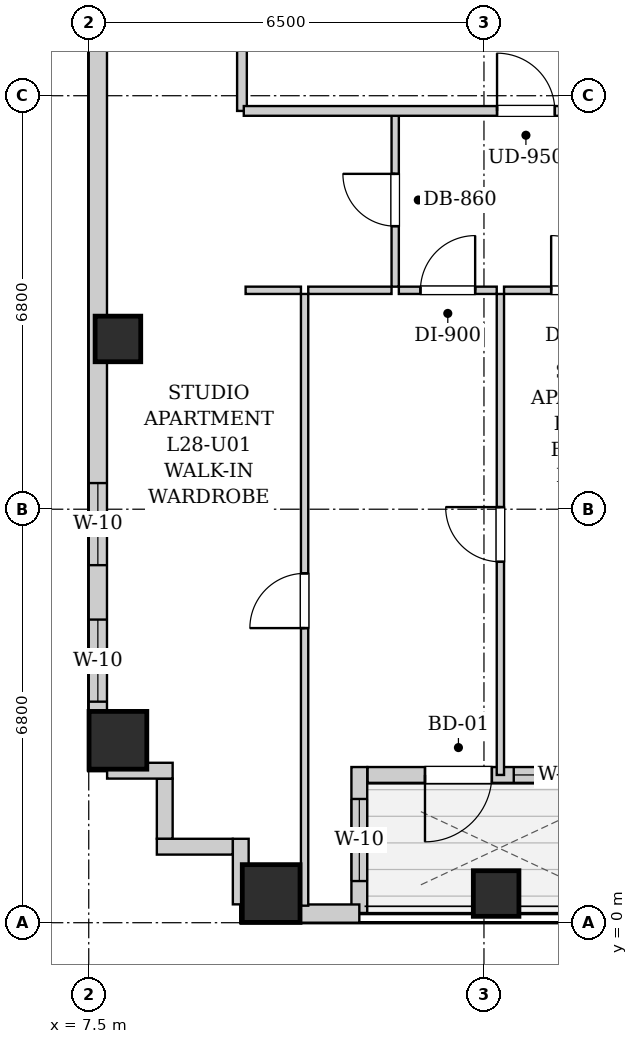
"""IFC4 building model, lengths in metres.
Left out: names, types, materials, properties, quantities, classifications, styles, units other than length and angle.
Written with IfcOpenShell. Run it as: python <this file> out.ifc"""

import sys

from ifc_helpers import new_model, si_unit, direction, frame, frame_2d, origin, origin_2d, place, context, subcontext, project, spatial, rectangle, extrude, element, fill, save


model = new_model("IFC4")
c1 = context("Model", 3, precision=1e-05, world=origin(), true_north=direction((0.0, 1.0)))
c2 = subcontext(c1, "Body", "Model", "MODEL_VIEW")
j1 = project(units=[si_unit("LENGTHUNIT", "METRE"), si_unit("PLANEANGLEUNIT", "RADIAN")], contexts=[c1])
p1 = place(None, origin())
s1 = spatial("IfcSite", under=j1, at=p1, CompositionType="ELEMENT")
p2 = place(p1, origin())
s2 = spatial("IfcBuilding", under=s1, at=p2, CompositionType="ELEMENT")
p3 = place(p2, frame((0.0, 0.0, 100.7)))
s3 = spatial("IfcBuildingStorey", under=s2, at=p3, CompositionType="ELEMENT", Elevation=100.7)
p4 = place(p3, frame((10.5, 0.48, 0.0), z_axis=(0.0, 0.0, 1.0), x_axis=(1.0, 0.0, 0.0)))
e1 = element("IfcColumn", 1, at=p4, inside=s3, PredefinedType="COLUMN", context=c2, shape_type="SweptSolid", body=[
    extrude(rectangle(XDim=0.95, YDim=0.95, at=origin_2d()), origin(), (0.0, 0.0, 1.0), 3.2),
])
p5 = place(p3, frame((14.2, 0.48, 0.0), z_axis=(0.0, 0.0, 1.0), x_axis=(1.0, 0.0, 0.0)))
e2 = element("IfcColumn", 2, at=p5, inside=s3, PredefinedType="COLUMN", context=c2, shape_type="SweptSolid", body=[
    extrude(rectangle(XDim=0.75, YDim=0.75, at=origin_2d()), origin(), (0.0, 0.0, 1.0), 3.2),
])
p6 = place(p3, frame((7.98, 3.0, 0.0), z_axis=(0.0, 0.0, 1.0), x_axis=(1.0, 0.0, 0.0)))
e3 = element("IfcColumn", 3, at=p6, inside=s3, PredefinedType="COLUMN", context=c2, shape_type="SweptSolid", body=[
    extrude(rectangle(XDim=0.95, YDim=0.95, at=origin_2d()), origin(), (0.0, 0.0, 1.0), 3.2),
])
p7 = place(p3, frame((7.98, 9.6, 0.0), z_axis=(0.0, 0.0, 1.0), x_axis=(1.0, 0.0, 0.0)))
e4 = element("IfcColumn", 4, at=p7, inside=s3, PredefinedType="COLUMN", context=c2, shape_type="SweptSolid", body=[
    extrude(rectangle(XDim=0.75, YDim=0.75, at=origin_2d()), origin(), (0.0, 0.0, 1.0), 3.2),
])
p8 = place(p3, frame((16.416, 2.43, 0.0), z_axis=(0.0, 0.0, 1.0), x_axis=(-1.0, 0.0, 0.0)))
e5 = element("IfcWall", 5, at=p8, inside=s3, PredefinedType="SOLIDWALL", context=c2, shape_type="SweptSolid", body=[
    extrude(rectangle(XDim=4.332, YDim=0.26, at=frame_2d((2.166, 0.0))), origin(), (0.0, 0.0, 1.0), 2.94),
])
p9 = place(p8, frame((2.286, 0.0, 0.0)))
e6 = element("IfcOpeningElement", 6, at=p9, cuts=e5, PredefinedType="OPENING", context=c2, shape_type="SweptSolid", body=[
    extrude(rectangle(XDim=1.1, YDim=2.0, at=frame_2d((0.55, 1.0))), frame((0.0, 0.14, 0.0), z_axis=(0.0, -1.0, 0.0), x_axis=(1.0, 0.0, 0.0)), (0.0, 0.0, 1.0), 0.28),
])
p10 = place(p8, frame((0.326, 0.0, 0.85)))
e7 = element("IfcOpeningElement", 7, at=p10, cuts=e5, PredefinedType="OPENING", context=c2, shape_type="SweptSolid", body=[
    extrude(rectangle(XDim=1.6, YDim=1.65, at=frame_2d((0.8, 0.825))), frame((0.0, 0.14, 0.0), z_axis=(0.0, -1.0, 0.0), x_axis=(1.0, 0.0, 0.0)), (0.0, 0.0, 1.0), 0.28),
])
p11 = place(p3, frame((11.95, 2.56, 0.0), z_axis=(0.0, 0.0, 1.0), x_axis=(0.0, -1.0, 0.0)))
e8 = element("IfcWall", 8, at=p11, inside=s3, PredefinedType="SOLIDWALL", context=c2, shape_type="SweptSolid", body=[
    extrude(rectangle(XDim=2.4, YDim=0.26, at=frame_2d((1.2, 0.0))), origin(), (0.0, 0.0, 1.0), 2.94),
])
p12 = place(p11, frame((0.525, 0.0, 0.55)))
e9 = element("IfcOpeningElement", 9, at=p12, cuts=e8, PredefinedType="OPENING", context=c2, shape_type="SweptSolid", body=[
    extrude(rectangle(XDim=1.35, YDim=1.2, at=frame_2d((0.675, 0.6))), frame((0.0, 0.14, 0.0), z_axis=(0.0, -1.0, 0.0), x_axis=(1.0, 0.0, 0.0)), (0.0, 0.0, 1.0), 0.28),
])
p13 = place(p3, frame((11.95, 0.15, 0.0), z_axis=(0.0, 0.0, 1.0), x_axis=(-1.0, 0.0, 0.0)))
e10 = element("IfcWall", 10, at=p13, inside=s3, PredefinedType="SOLIDWALL", context=c2, shape_type="SweptSolid", body=[
    extrude(rectangle(XDim=1.95, YDim=0.3, at=frame_2d((0.975, 0.0))), origin(), (0.0, 0.0, 1.0), 2.94),
])
p14 = place(p3, frame((7.65, 2.5, 0.0), z_axis=(0.0, 0.0, 1.0), x_axis=(0.0, 1.0, 0.0)))
e11 = element("IfcWall", 11, at=p14, inside=s3, PredefinedType="SOLIDWALL", context=c2, shape_type="SweptSolid", body=[
    extrude(rectangle(XDim=38.3, YDim=0.3, at=frame_2d((19.15, 0.0))), origin(), (0.0, 0.0, 1.0), 2.94),
])
p15 = place(p14, frame((3.38, 0.0, 0.55)))
e12 = element("IfcOpeningElement", 12, at=p15, cuts=e11, PredefinedType="OPENING", context=c2, shape_type="SweptSolid", body=[
    extrude(rectangle(XDim=1.35, YDim=1.2, at=frame_2d((0.675, 0.6))), frame((0.0, 0.16, 0.0), z_axis=(0.0, -1.0, 0.0), x_axis=(1.0, 0.0, 0.0)), (0.0, 0.0, 1.0), 0.32),
])
p16 = place(p14, frame((1.135, 0.0, 0.55)))
e13 = element("IfcOpeningElement", 13, at=p16, cuts=e11, PredefinedType="OPENING", context=c2, shape_type="SweptSolid", body=[
    extrude(rectangle(XDim=1.35, YDim=1.2, at=frame_2d((0.675, 0.6))), frame((0.0, 0.16, 0.0), z_axis=(0.0, -1.0, 0.0), x_axis=(1.0, 0.0, 0.0)), (0.0, 0.0, 1.0), 0.32),
])
p17 = place(p14, frame((33.946, 0.0, 0.55)))
e14 = element("IfcOpeningElement", 14, at=p17, cuts=e11, PredefinedType="OPENING", context=c2, shape_type="SweptSolid", body=[
    extrude(rectangle(XDim=1.35, YDim=1.2, at=frame_2d((0.675, 0.6))), frame((0.0, 0.16, 0.0), z_axis=(0.0, -1.0, 0.0), x_axis=(1.0, 0.0, 0.0)), (0.0, 0.0, 1.0), 0.32),
])
p18 = place(p14, frame((32.035, 0.0, 0.55)))
e15 = element("IfcOpeningElement", 15, at=p18, cuts=e11, PredefinedType="OPENING", context=c2, shape_type="SweptSolid", body=[
    extrude(rectangle(XDim=1.35, YDim=1.2, at=frame_2d((0.675, 0.6))), frame((0.0, 0.16, 0.0), z_axis=(0.0, -1.0, 0.0), x_axis=(1.0, 0.0, 0.0)), (0.0, 0.0, 1.0), 0.32),
])
p19 = place(p14, frame((15.65, 0.0, 0.55)))
e16 = element("IfcOpeningElement", 16, at=p19, cuts=e11, PredefinedType="OPENING", context=c2, shape_type="SweptSolid", body=[
    extrude(rectangle(XDim=1.35, YDim=1.2, at=frame_2d((0.675, 0.6))), frame((0.0, 0.16, 0.0), z_axis=(0.0, -1.0, 0.0), x_axis=(1.0, 0.0, 0.0)), (0.0, 0.0, 1.0), 0.32),
])
p20 = place(p14, frame((13.035, 0.0, 0.55)))
e17 = element("IfcOpeningElement", 17, at=p20, cuts=e11, PredefinedType="OPENING", context=c2, shape_type="SweptSolid", body=[
    extrude(rectangle(XDim=1.35, YDim=1.2, at=frame_2d((0.675, 0.6))), frame((0.0, 0.16, 0.0), z_axis=(0.0, -1.0, 0.0), x_axis=(1.0, 0.0, 0.0)), (0.0, 0.0, 1.0), 0.32),
])
p21 = place(p14, frame((22.831, 0.0, 0.55)))
e18 = element("IfcOpeningElement", 18, at=p21, cuts=e11, PredefinedType="OPENING", context=c2, shape_type="SweptSolid", body=[
    extrude(rectangle(XDim=1.35, YDim=1.2, at=frame_2d((0.675, 0.6))), frame((0.0, 0.16, 0.0), z_axis=(0.0, -1.0, 0.0), x_axis=(1.0, 0.0, 0.0)), (0.0, 0.0, 1.0), 0.32),
])
p22 = place(p14, frame((24.441, 0.0, 0.55)))
e19 = element("IfcOpeningElement", 19, at=p22, cuts=e11, PredefinedType="OPENING", context=c2, shape_type="SweptSolid", body=[
    extrude(rectangle(XDim=1.35, YDim=1.2, at=frame_2d((0.675, 0.6))), frame((0.0, 0.16, 0.0), z_axis=(0.0, -1.0, 0.0), x_axis=(1.0, 0.0, 0.0)), (0.0, 0.0, 1.0), 0.32),
])
p23 = place(p3, frame((10.0, 0.302, 0.0), z_axis=(0.0, 0.0, 1.0), x_axis=(0.0, 1.0, 0.0)))
e20 = element("IfcWall", 20, at=p23, inside=s3, PredefinedType="SOLIDWALL", context=c2, shape_type="SweptSolid", body=[
    extrude(rectangle(XDim=1.078, YDim=0.26, at=frame_2d((0.539, 0.0))), origin(), (0.0, 0.0, 1.0), 2.94),
])
p24 = place(p3, frame((9.868, 1.25, 0.0), z_axis=(0.0, 0.0, 1.0), x_axis=(-1.0, 0.0, 0.0)))
e21 = element("IfcWall", 21, at=p24, inside=s3, PredefinedType="SOLIDWALL", context=c2, shape_type="SweptSolid", body=[
    extrude(rectangle(XDim=1.248, YDim=0.26, at=frame_2d((0.624, 0.0))), origin(), (0.0, 0.0, 1.0), 2.94),
])
p25 = place(p3, frame((8.75, 1.382, 0.0), z_axis=(0.0, 0.0, 1.0), x_axis=(0.0, 1.0, 0.0)))
e22 = element("IfcWall", 22, at=p25, inside=s3, PredefinedType="SOLIDWALL", context=c2, shape_type="SweptSolid", body=[
    extrude(rectangle(XDim=0.986, YDim=0.26, at=frame_2d((0.493, 0.0))), origin(), (0.0, 0.0, 1.0), 2.94),
])
p26 = place(p3, frame((8.88, 2.5, 0.0), z_axis=(0.0, 0.0, 1.0), x_axis=(-1.0, 0.0, 0.0)))
e23 = element("IfcWall", 23, at=p26, inside=s3, PredefinedType="SOLIDWALL", context=c2, shape_type="SweptSolid", body=[
    extrude(rectangle(XDim=1.078, YDim=0.26, at=frame_2d((0.539, 0.0))), origin(), (0.0, 0.0, 1.0), 2.94),
])
p27 = place(p3, frame((10.02, 13.35, 0.0), z_axis=(0.0, 0.0, 1.0), x_axis=(0.0, 1.0, 0.0)))
e24 = element("IfcWall", 24, at=p27, inside=s3, PredefinedType="PARTITIONING", context=c2, shape_type="SweptSolid", body=[
    extrude(rectangle(XDim=1.74, YDim=0.16, at=frame_2d((0.87, 0.0))), origin(), (0.0, 0.0, 1.0), 2.94),
])
p28 = place(p3, frame((12.54, 10.46, 0.0), z_axis=(0.0, 0.0, 1.0), x_axis=(0.0, 1.0, 0.0)))
e25 = element("IfcWall", 25, at=p28, inside=s3, PredefinedType="PARTITIONING", context=c2, shape_type="SweptSolid", body=[
    extrude(rectangle(XDim=2.85, YDim=0.12, at=frame_2d((1.425, 0.0))), origin(), (0.0, 0.0, 1.0), 2.94),
])
p29 = place(p28, frame((0.995, 0.0, 0.0)))
e26 = element("IfcOpeningElement", 26, at=p29, cuts=e25, PredefinedType="OPENING", context=c2, shape_type="SweptSolid", body=[
    extrude(rectangle(XDim=0.86, YDim=2.05, at=frame_2d((0.43, 1.025))), frame((0.0, 0.07, 0.0), z_axis=(0.0, -1.0, 0.0), x_axis=(1.0, 0.0, 0.0)), (0.0, 0.0, 1.0), 0.14),
])
p30 = place(p3, frame((10.08, 10.4, 0.0), z_axis=(0.0, 0.0, 1.0), x_axis=(1.0, 0.0, 0.0)))
e27 = element("IfcWall", 27, at=p30, inside=s3, PredefinedType="PARTITIONING", context=c2, shape_type="SweptSolid", body=[
    extrude(rectangle(XDim=0.91, YDim=0.12, at=frame_2d((0.455, 0.0))), origin(), (0.0, 0.0, 1.0), 2.94),
])
p31 = place(p3, frame((11.11, 10.4, 0.0), z_axis=(0.0, 0.0, 1.0), x_axis=(1.0, 0.0, 0.0)))
e28 = element("IfcWall", 28, at=p31, inside=s3, PredefinedType="PARTITIONING", context=c2, shape_type="SweptSolid", body=[
    extrude(rectangle(XDim=1.37, YDim=0.12, at=frame_2d((0.685, 0.0))), origin(), (0.0, 0.0, 1.0), 2.94),
])
p32 = place(p3, frame((12.6, 10.4, 0.0), z_axis=(0.0, 0.0, 1.0), x_axis=(1.0, 0.0, 0.0)))
e29 = element("IfcWall", 29, at=p32, inside=s3, PredefinedType="PARTITIONING", context=c2, shape_type="SweptSolid", body=[
    extrude(rectangle(XDim=1.61, YDim=0.12, at=frame_2d((0.805, 0.0))), origin(), (0.0, 0.0, 1.0), 2.94),
])
p33 = place(p32, frame((0.355, 0.0, 0.0)))
e30 = element("IfcOpeningElement", 30, at=p33, cuts=e29, PredefinedType="OPENING", context=c2, shape_type="SweptSolid", body=[
    extrude(rectangle(XDim=0.9, YDim=2.05, at=frame_2d((0.45, 1.025))), frame((0.0, 0.07, 0.0), z_axis=(0.0, -1.0, 0.0), x_axis=(1.0, 0.0, 0.0)), (0.0, 0.0, 1.0), 0.14),
])
p34 = place(p3, frame((14.33, 10.4, 0.0), z_axis=(0.0, 0.0, 1.0), x_axis=(1.0, 0.0, 0.0)))
e31 = element("IfcWall", 31, at=p34, inside=s3, PredefinedType="PARTITIONING", context=c2, shape_type="SweptSolid", body=[
    extrude(rectangle(XDim=2.45, YDim=0.12, at=frame_2d((1.225, 0.0))), origin(), (0.0, 0.0, 1.0), 2.94),
])
p35 = place(p34, frame((0.775, 0.0, 0.0)))
e32 = element("IfcOpeningElement", 32, at=p35, cuts=e31, PredefinedType="OPENING", context=c2, shape_type="SweptSolid", body=[
    extrude(rectangle(XDim=0.9, YDim=2.05, at=frame_2d((0.45, 1.025))), frame((0.0, 0.07, 0.0), z_axis=(0.0, -1.0, 0.0), x_axis=(1.0, 0.0, 0.0)), (0.0, 0.0, 1.0), 0.14),
])
p36 = place(p3, frame((11.05, 0.28, 0.0), z_axis=(0.0, 0.0, 1.0), x_axis=(0.0, 1.0, 0.0)))
e33 = element("IfcWall", 33, at=p36, inside=s3, PredefinedType="PARTITIONING", context=c2, shape_type="SweptSolid", body=[
    extrude(rectangle(XDim=10.06, YDim=0.12, at=frame_2d((5.03, 0.0))), origin(), (0.0, 0.0, 1.0), 2.94),
])
p37 = place(p36, frame((4.565, 0.0, 0.0)))
e34 = element("IfcOpeningElement", 34, at=p37, cuts=e33, PredefinedType="OPENING", context=c2, shape_type="SweptSolid", body=[
    extrude(rectangle(XDim=0.9, YDim=2.05, at=frame_2d((0.45, 1.025))), frame((0.0, 0.07, 0.0), z_axis=(0.0, -1.0, 0.0), x_axis=(1.0, 0.0, 0.0)), (0.0, 0.0, 1.0), 0.14),
])
p38 = place(p3, frame((14.27, 2.43, 0.0), z_axis=(0.0, 0.0, 1.0), x_axis=(0.0, 1.0, 0.0)))
e35 = element("IfcWall", 35, at=p38, inside=s3, PredefinedType="PARTITIONING", context=c2, shape_type="SweptSolid", body=[
    extrude(rectangle(XDim=7.91, YDim=0.12, at=frame_2d((3.955, 0.0))), origin(), (0.0, 0.0, 1.0), 2.94),
])
p39 = place(p38, frame((3.505, 0.0, 0.0)))
e36 = element("IfcOpeningElement", 36, at=p39, cuts=e35, PredefinedType="OPENING", context=c2, shape_type="SweptSolid", body=[
    extrude(rectangle(XDim=0.9, YDim=2.05, at=frame_2d((0.45, 1.025))), frame((0.0, 0.07, 0.0), z_axis=(0.0, -1.0, 0.0), x_axis=(1.0, 0.0, 0.0)), (0.0, 0.0, 1.0), 0.14),
])
p40 = place(p3, frame((10.05, 13.35, 0.0), z_axis=(0.0, 0.0, 1.0), x_axis=(1.0, 0.0, 0.0)))
e37 = element("IfcWall", 37, at=p40, inside=s3, PredefinedType="PARTITIONING", context=c2, shape_type="SweptSolid", body=[
    extrude(rectangle(XDim=30.8, YDim=0.16, at=frame_2d((15.4, 0.0))), origin(), (0.0, 0.0, 1.0), 2.94),
])
p41 = place(p40, frame((4.165, 0.0, 0.0)))
e38 = element("IfcOpeningElement", 38, at=p41, cuts=e37, PredefinedType="OPENING", context=c2, shape_type="SweptSolid", body=[
    extrude(rectangle(XDim=0.95, YDim=2.1, at=frame_2d((0.475, 1.05))), frame((0.0, 0.09, 0.0), z_axis=(0.0, -1.0, 0.0), x_axis=(1.0, 0.0, 0.0)), (0.0, 0.0, 1.0), 0.18),
])
p42 = place(p29, origin())
e39 = element("IfcDoor", 39, at=p42, inside=s3, OperationType="SINGLE_SWING_RIGHT", PredefinedType="DOOR", context=c2, shape_type="SweptSolid", body=[
    extrude(rectangle(XDim=0.86, YDim=2.05, at=frame_2d((0.43, 1.025))), frame((0.0, 0.025, 0.0), z_axis=(0.0, -1.0, 0.0), x_axis=(1.0, 0.0, 0.0)), (0.0, 0.0, 1.0), 0.05),
])
fill(e26, e39)
p43 = place(p33, origin())
e40 = element("IfcDoor", 40, at=p43, inside=s3, OperationType="SINGLE_SWING_RIGHT", PredefinedType="DOOR", context=c2, shape_type="SweptSolid", body=[
    extrude(rectangle(XDim=0.9, YDim=2.05, at=frame_2d((0.45, 1.025))), frame((0.0, 0.025, 0.0), z_axis=(0.0, -1.0, 0.0), x_axis=(1.0, 0.0, 0.0)), (0.0, 0.0, 1.0), 0.05),
])
fill(e30, e40)
p44 = place(p35, origin())
e41 = element("IfcDoor", 41, at=p44, inside=s3, OperationType="SINGLE_SWING_LEFT", PredefinedType="DOOR", context=c2, shape_type="SweptSolid", body=[
    extrude(rectangle(XDim=0.9, YDim=2.05, at=frame_2d((0.45, 1.025))), frame((0.0, 0.025, 0.0), z_axis=(0.0, -1.0, 0.0), x_axis=(1.0, 0.0, 0.0)), (0.0, 0.0, 1.0), 0.05),
])
fill(e32, e41)
p45 = place(p37, origin())
e42 = element("IfcDoor", 42, at=p45, inside=s3, OperationType="SINGLE_SWING_LEFT", PredefinedType="DOOR", context=c2, shape_type="SweptSolid", body=[
    extrude(rectangle(XDim=0.9, YDim=2.05, at=frame_2d((0.45, 1.025))), frame((0.0, 0.025, 0.0), z_axis=(0.0, -1.0, 0.0), x_axis=(1.0, 0.0, 0.0)), (0.0, 0.0, 1.0), 0.05),
])
fill(e34, e42)
p46 = place(p39, origin())
e43 = element("IfcDoor", 43, at=p46, inside=s3, OperationType="SINGLE_SWING_RIGHT", PredefinedType="DOOR", context=c2, shape_type="SweptSolid", body=[
    extrude(rectangle(XDim=0.9, YDim=2.05, at=frame_2d((0.45, 1.025))), frame((0.0, 0.025, 0.0), z_axis=(0.0, -1.0, 0.0), x_axis=(1.0, 0.0, 0.0)), (0.0, 0.0, 1.0), 0.05),
])
fill(e36, e43)
p47 = place(p41, origin())
e44 = element("IfcDoor", 44, at=p47, inside=s3, OperationType="SINGLE_SWING_LEFT", PredefinedType="DOOR", context=c2, shape_type="SweptSolid", body=[
    extrude(rectangle(XDim=0.95, YDim=2.1, at=frame_2d((0.475, 1.05))), frame((0.0, 0.025, 0.0), z_axis=(0.0, -1.0, 0.0), x_axis=(1.0, 0.0, 0.0)), (0.0, 0.0, 1.0), 0.05),
])
fill(e38, e44)
p48 = place(p9, origin())
e45 = element("IfcDoor", 45, at=p48, inside=s3, OperationType="SINGLE_SWING_RIGHT", PredefinedType="DOOR", context=c2, shape_type="SweptSolid", body=[
    extrude(rectangle(XDim=1.1, YDim=2.0, at=frame_2d((0.55, 1.0))), frame((0.0, 0.025, 0.0), z_axis=(0.0, -1.0, 0.0), x_axis=(1.0, 0.0, 0.0)), (0.0, 0.0, 1.0), 0.05),
])
fill(e6, e45)
p49 = place(p15, origin())
e46 = element("IfcWindow", 46, at=p49, inside=s3, PartitioningType="SINGLE_PANEL", PredefinedType="WINDOW", context=c2, shape_type="SweptSolid", body=[
    extrude(rectangle(XDim=1.35, YDim=1.2, at=frame_2d((0.675, 0.6))), frame((0.0, 0.03, 0.0), z_axis=(0.0, -1.0, 0.0), x_axis=(1.0, 0.0, 0.0)), (0.0, 0.0, 1.0), 0.06),
])
fill(e12, e46)
p50 = place(p16, origin())
e47 = element("IfcWindow", 47, at=p50, inside=s3, PartitioningType="SINGLE_PANEL", PredefinedType="WINDOW", context=c2, shape_type="SweptSolid", body=[
    extrude(rectangle(XDim=1.35, YDim=1.2, at=frame_2d((0.675, 0.6))), frame((0.0, 0.03, 0.0), z_axis=(0.0, -1.0, 0.0), x_axis=(1.0, 0.0, 0.0)), (0.0, 0.0, 1.0), 0.06),
])
fill(e13, e47)
p51 = place(p12, origin())
e48 = element("IfcWindow", 48, at=p51, inside=s3, PartitioningType="SINGLE_PANEL", PredefinedType="WINDOW", context=c2, shape_type="SweptSolid", body=[
    extrude(rectangle(XDim=1.35, YDim=1.2, at=frame_2d((0.675, 0.6))), frame((0.0, 0.03, 0.0), z_axis=(0.0, -1.0, 0.0), x_axis=(1.0, 0.0, 0.0)), (0.0, 0.0, 1.0), 0.06),
])
fill(e9, e48)
p52 = place(p10, origin())
e49 = element("IfcWindow", 49, at=p52, inside=s3, PartitioningType="DOUBLE_PANEL_VERTICAL", PredefinedType="WINDOW", context=c2, shape_type="SweptSolid", body=[
    extrude(rectangle(XDim=1.6, YDim=1.65, at=frame_2d((0.8, 0.825))), frame((0.0, 0.03, 0.0), z_axis=(0.0, -1.0, 0.0), x_axis=(1.0, 0.0, 0.0)), (0.0, 0.0, 1.0), 0.06),
])
fill(e7, e49)
save(model, sys.argv[1])
